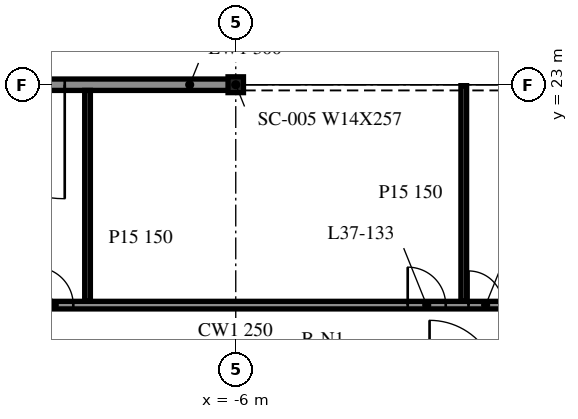
"""IFC4 building model, lengths in metres.
Left out: names, types, materials, properties, quantities, classifications, styles, units other than length and angle.
Written with IfcOpenShell. Run it as: python <this file> out.ifc"""

import sys

from ifc_helpers import new_model, si_unit, direction, frame, frame_2d, origin, origin_2d, place, context, subcontext, project, spatial, rectangle, i_section, extrude, element, fill, save


model = new_model("IFC4")
c1 = context("Model", 3, precision=1e-05, world=origin(), true_north=direction((0.0, 1.0)))
c2 = subcontext(c1, "Body", "Model", "MODEL_VIEW")
j1 = project(units=[si_unit("LENGTHUNIT", "METRE"), si_unit("PLANEANGLEUNIT", "RADIAN")], contexts=[c1])
p1 = place(None, origin())
s1 = spatial("IfcSite", under=j1, at=p1, CompositionType="ELEMENT")
p2 = place(p1, origin())
s2 = spatial("IfcBuilding", under=s1, at=p2, CompositionType="ELEMENT")
p3 = place(p2, frame((0.0, 0.0, 159.2)))
s3 = spatial("IfcBuildingStorey", under=s2, at=p3, CompositionType="ELEMENT", Elevation=159.2)
p4 = place(p3, frame((-6.0, 23.0, -0.34), z_axis=(0.0, 0.0, 1.0), x_axis=(1.0, 0.0, 0.0)))
e1 = element("IfcColumn", 1, at=p4, inside=s3, PredefinedType="COLUMN", context=c2, shape_type="SweptSolid", body=[
    extrude(i_section(OverallWidth=0.406, OverallDepth=0.417, WebThickness=0.03, FlangeThickness=0.048, at=origin_2d()), origin(), (0.0, 0.0, 1.0), 3.8),
])
p5 = place(p3, frame((-6.015, 23.0, 0.0), z_axis=(0.0, 0.0, 1.0), x_axis=(-1.0, 0.0, 0.0)))
e2 = element("IfcWall", 2, at=p5, inside=s3, PredefinedType="NOTDEFINED", context=c2, shape_type="SweptSolid", body=[
    extrude(rectangle(XDim=11.97, YDim=0.3, at=frame_2d((5.985, 0.0))), origin(), (0.0, 0.0, 1.0), 2.782),
])
p6 = place(p5, frame((4.485, 0.0, 0.0)))
e3 = element("IfcOpeningElement", 3, at=p6, cuts=e2, PredefinedType="OPENING", context=c2, shape_type="SweptSolid", body=[
    extrude(rectangle(XDim=3.0, YDim=2.4, at=frame_2d((1.5, 1.2))), frame((0.0, 0.16, 0.0), z_axis=(0.0, -1.0, 0.0), x_axis=(1.0, 0.0, 0.0)), (0.0, 0.0, 1.0), 0.32),
])
p7 = place(p3, frame((-47.975, 17.2, 0.0), z_axis=(0.0, 0.0, 1.0), x_axis=(1.0, 0.0, 0.0)))
e4 = element("IfcWall", 4, at=p7, inside=s3, PredefinedType="PARTITIONING", context=c2, shape_type="SweptSolid", body=[
    extrude(rectangle(XDim=95.95, YDim=0.2, at=frame_2d((47.975, 0.0))), origin(), (0.0, 0.0, 1.0), 3.46),
])
p8 = place(p7, frame((4.5, 0.0, 0.0)))
e5 = element("IfcOpeningElement", 5, at=p8, cuts=e4, PredefinedType="OPENING", context=c2, shape_type="SweptSolid", body=[
    extrude(rectangle(XDim=1.0, YDim=2.1, at=frame_2d((0.5, 1.05))), frame((0.0, 0.11, 0.0), z_axis=(0.0, -1.0, 0.0), x_axis=(1.0, 0.0, 0.0)), (0.0, 0.0, 1.0), 0.22),
])
p9 = place(p7, frame((10.5, 0.0, 0.0)))
e6 = element("IfcOpeningElement", 6, at=p9, cuts=e4, PredefinedType="OPENING", context=c2, shape_type="SweptSolid", body=[
    extrude(rectangle(XDim=1.0, YDim=2.1, at=frame_2d((0.5, 1.05))), frame((0.0, 0.11, 0.0), z_axis=(0.0, -1.0, 0.0), x_axis=(1.0, 0.0, 0.0)), (0.0, 0.0, 1.0), 0.22),
])
p10 = place(p7, frame((22.7, 0.0, 0.0)))
e7 = element("IfcOpeningElement", 7, at=p10, cuts=e4, PredefinedType="OPENING", context=c2, shape_type="SweptSolid", body=[
    extrude(rectangle(XDim=0.9, YDim=2.1, at=frame_2d((0.45, 1.05))), frame((0.0, 0.11, 0.0), z_axis=(0.0, -1.0, 0.0), x_axis=(1.0, 0.0, 0.0)), (0.0, 0.0, 1.0), 0.22),
])
p11 = place(p7, frame((25.7, 0.0, 0.0)))
e8 = element("IfcOpeningElement", 8, at=p11, cuts=e4, PredefinedType="OPENING", context=c2, shape_type="SweptSolid", body=[
    extrude(rectangle(XDim=1.2, YDim=2.1, at=frame_2d((0.6, 1.05))), frame((0.0, 0.11, 0.0), z_axis=(0.0, -1.0, 0.0), x_axis=(1.0, 0.0, 0.0)), (0.0, 0.0, 1.0), 0.22),
])
p12 = place(p7, frame((28.7, 0.0, 0.0)))
e9 = element("IfcOpeningElement", 9, at=p12, cuts=e4, PredefinedType="OPENING", context=c2, shape_type="SweptSolid", body=[
    extrude(rectangle(XDim=0.9, YDim=2.1, at=frame_2d((0.45, 1.05))), frame((0.0, 0.11, 0.0), z_axis=(0.0, -1.0, 0.0), x_axis=(1.0, 0.0, 0.0)), (0.0, 0.0, 1.0), 0.22),
])
p13 = place(p7, frame((36.7, 0.0, 0.0)))
e10 = element("IfcOpeningElement", 10, at=p13, cuts=e4, PredefinedType="OPENING", context=c2, shape_type="SweptSolid", body=[
    extrude(rectangle(XDim=1.0, YDim=2.1, at=frame_2d((0.5, 1.05))), frame((0.0, 0.11, 0.0), z_axis=(0.0, -1.0, 0.0), x_axis=(1.0, 0.0, 0.0)), (0.0, 0.0, 1.0), 0.22),
])
p14 = place(p7, frame((46.5, 0.0, 0.0)))
e11 = element("IfcOpeningElement", 11, at=p14, cuts=e4, PredefinedType="OPENING", context=c2, shape_type="SweptSolid", body=[
    extrude(rectangle(XDim=1.0, YDim=2.1, at=frame_2d((0.5, 1.05))), frame((0.0, 0.11, 0.0), z_axis=(0.0, -1.0, 0.0), x_axis=(1.0, 0.0, 0.0)), (0.0, 0.0, 1.0), 0.22),
])
p15 = place(p7, frame((48.1, 0.0, 0.0)))
e12 = element("IfcOpeningElement", 12, at=p15, cuts=e4, PredefinedType="OPENING", context=c2, shape_type="SweptSolid", body=[
    extrude(rectangle(XDim=0.9, YDim=2.1, at=frame_2d((0.45, 1.05))), frame((0.0, 0.11, 0.0), z_axis=(0.0, -1.0, 0.0), x_axis=(1.0, 0.0, 0.0)), (0.0, 0.0, 1.0), 0.22),
])
p16 = place(p7, frame((51.5, 0.0, 0.0)))
e13 = element("IfcOpeningElement", 13, at=p16, cuts=e4, PredefinedType="OPENING", context=c2, shape_type="SweptSolid", body=[
    extrude(rectangle(XDim=1.2, YDim=2.1, at=frame_2d((0.6, 1.05))), frame((0.0, 0.11, 0.0), z_axis=(0.0, -1.0, 0.0), x_axis=(1.0, 0.0, 0.0)), (0.0, 0.0, 1.0), 0.22),
])
p17 = place(p7, frame((54.1, 0.0, 0.0)))
e14 = element("IfcOpeningElement", 14, at=p17, cuts=e4, PredefinedType="OPENING", context=c2, shape_type="SweptSolid", body=[
    extrude(rectangle(XDim=0.9, YDim=2.1, at=frame_2d((0.45, 1.05))), frame((0.0, 0.11, 0.0), z_axis=(0.0, -1.0, 0.0), x_axis=(1.0, 0.0, 0.0)), (0.0, 0.0, 1.0), 0.22),
])
p18 = place(p7, frame((62.3, 0.0, 0.0)))
e15 = element("IfcOpeningElement", 15, at=p18, cuts=e4, PredefinedType="OPENING", context=c2, shape_type="SweptSolid", body=[
    extrude(rectangle(XDim=1.0, YDim=2.1, at=frame_2d((0.5, 1.05))), frame((0.0, 0.11, 0.0), z_axis=(0.0, -1.0, 0.0), x_axis=(1.0, 0.0, 0.0)), (0.0, 0.0, 1.0), 0.22),
])
p19 = place(p7, frame((74.3, 0.0, 0.0)))
e16 = element("IfcOpeningElement", 16, at=p19, cuts=e4, PredefinedType="OPENING", context=c2, shape_type="SweptSolid", body=[
    extrude(rectangle(XDim=1.0, YDim=2.1, at=frame_2d((0.5, 1.05))), frame((0.0, 0.11, 0.0), z_axis=(0.0, -1.0, 0.0), x_axis=(1.0, 0.0, 0.0)), (0.0, 0.0, 1.0), 0.22),
])
p20 = place(p7, frame((78.1, 0.0, 0.0)))
e17 = element("IfcOpeningElement", 17, at=p20, cuts=e4, PredefinedType="OPENING", context=c2, shape_type="SweptSolid", body=[
    extrude(rectangle(XDim=0.9, YDim=2.1, at=frame_2d((0.45, 1.05))), frame((0.0, 0.11, 0.0), z_axis=(0.0, -1.0, 0.0), x_axis=(1.0, 0.0, 0.0)), (0.0, 0.0, 1.0), 0.22),
])
p21 = place(p7, frame((84.1, 0.0, 0.0)))
e18 = element("IfcOpeningElement", 18, at=p21, cuts=e4, PredefinedType="OPENING", context=c2, shape_type="SweptSolid", body=[
    extrude(rectangle(XDim=1.2, YDim=2.1, at=frame_2d((0.6, 1.05))), frame((0.0, 0.11, 0.0), z_axis=(0.0, -1.0, 0.0), x_axis=(1.0, 0.0, 0.0)), (0.0, 0.0, 1.0), 0.22),
])
p22 = place(p3, frame((-9.9, 17.3, 0.0), z_axis=(0.0, 0.0, 1.0), x_axis=(0.0, 1.0, 0.0)))
e19 = element("IfcWall", 19, at=p22, inside=s3, PredefinedType="PARTITIONING", context=c2, shape_type="SweptSolid", body=[
    extrude(rectangle(XDim=5.55, YDim=0.15, at=frame_2d((2.775, 0.0))), origin(), (0.0, 0.0, 1.0), 3.46),
])
p23 = place(p3, frame((0.0, 17.3, 0.0), z_axis=(0.0, 0.0, 1.0), x_axis=(0.0, 1.0, 0.0)))
e20 = element("IfcWall", 20, at=p23, inside=s3, PredefinedType="PARTITIONING", context=c2, shape_type="SweptSolid", body=[
    extrude(rectangle(XDim=5.675, YDim=0.15, at=frame_2d((2.837, 0.0))), origin(), (0.0, 0.0, 1.0), 3.46),
])
p24 = place(p6, origin())
e21 = element("IfcDoor", 21, at=p24, inside=s3, OperationType="SINGLE_SWING_LEFT", PredefinedType="DOOR", context=c2, shape_type="SweptSolid", body=[
    extrude(rectangle(XDim=3.0, YDim=2.4, at=frame_2d((1.5, 1.2))), frame((0.0, 0.025, 0.0), z_axis=(0.0, -1.0, 0.0), x_axis=(1.0, 0.0, 0.0)), (0.0, 0.0, 1.0), 0.05),
])
fill(e3, e21)
p25 = place(p13, origin())
e22 = element("IfcDoor", 22, at=p25, inside=s3, OperationType="SINGLE_SWING_LEFT", PredefinedType="DOOR", context=c2, shape_type="SweptSolid", body=[
    extrude(rectangle(XDim=1.0, YDim=2.1, at=frame_2d((0.5, 1.05))), frame((0.0, 0.025, 0.0), z_axis=(0.0, -1.0, 0.0), x_axis=(1.0, 0.0, 0.0)), (0.0, 0.0, 1.0), 0.05),
])
fill(e10, e22)
p26 = place(p14, origin())
e23 = element("IfcDoor", 23, at=p26, inside=s3, OperationType="SINGLE_SWING_LEFT", PredefinedType="DOOR", context=c2, shape_type="SweptSolid", body=[
    extrude(rectangle(XDim=1.0, YDim=2.1, at=frame_2d((0.5, 1.05))), frame((0.0, 0.025, 0.0), z_axis=(0.0, -1.0, 0.0), x_axis=(1.0, 0.0, 0.0)), (0.0, 0.0, 1.0), 0.05),
])
fill(e11, e23)
p27 = place(p15, origin())
e24 = element("IfcDoor", 24, at=p27, inside=s3, OperationType="SINGLE_SWING_RIGHT", PredefinedType="DOOR", context=c2, shape_type="SweptSolid", body=[
    extrude(rectangle(XDim=0.9, YDim=2.1, at=frame_2d((0.45, 1.05))), frame((0.0, 0.025, 0.0), z_axis=(0.0, -1.0, 0.0), x_axis=(1.0, 0.0, 0.0)), (0.0, 0.0, 1.0), 0.05),
])
fill(e12, e24)
save(model, sys.argv[1])
